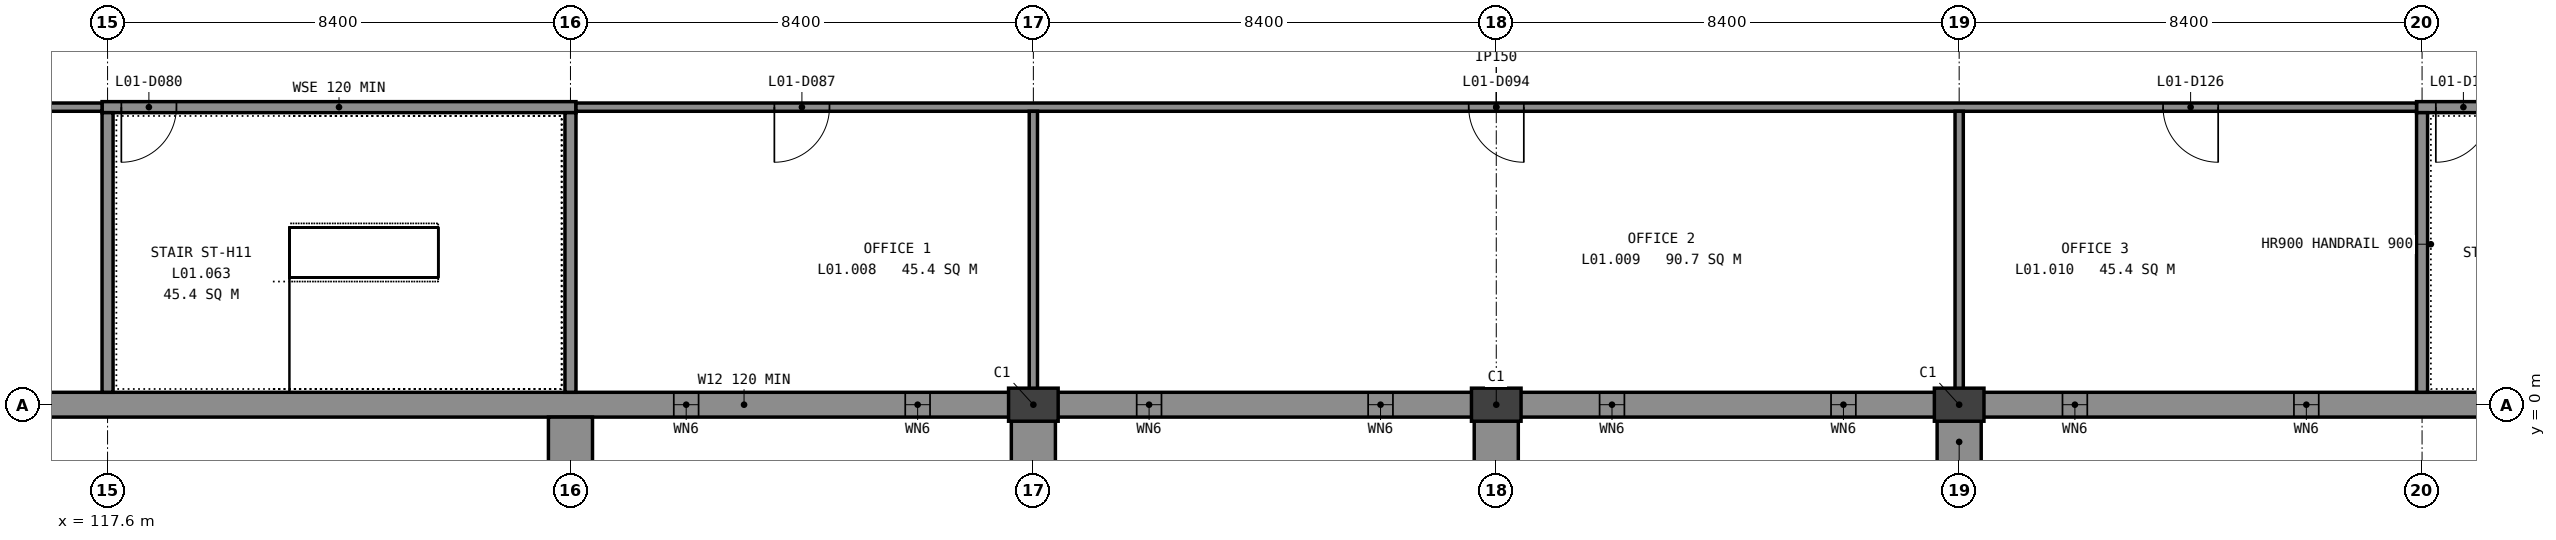
"""IFC4 building model, lengths in metres.
Left out: names, types, materials, properties, quantities, classifications, styles, units other than length and angle.
Written with IfcOpenShell. Run it as: python <this file> out.ifc"""

import sys

from ifc_helpers import new_model, si_unit, direction, frame, frame_2d, origin, origin_2d, place, context, subcontext, project, spatial, rectangle, extrude, element, fill, save


model = new_model("IFC4")
c1 = context("Model", 3, precision=1e-05, world=origin(), true_north=direction((0.0, 1.0)))
c2 = subcontext(c1, "Body", "Model", "MODEL_VIEW")
j1 = project(units=[si_unit("LENGTHUNIT", "METRE"), si_unit("PLANEANGLEUNIT", "RADIAN")], contexts=[c1])
p1 = place(None, origin())
s1 = spatial("IfcSite", under=j1, at=p1, CompositionType="ELEMENT")
p2 = place(p1, origin())
s2 = spatial("IfcBuilding", under=s1, at=p2, CompositionType="ELEMENT")
p3 = place(p2, frame((0.0, 0.0, 5.4)))
s3 = spatial("IfcBuildingStorey", under=s2, at=p3, CompositionType="ELEMENT", Elevation=5.4)
for number, where, z_axis, x_axis in (
    (1, (134.4, 0.0, -0.3), (0.0, 0.0, 1.0), (1.0, 0.0, 0.0)),
    (2, (142.8, 0.0, -0.3), (0.0, 0.0, 1.0), (1.0, 0.0, 0.0)),
    (3, (151.2, 0.0, -0.3), (0.0, 0.0, 1.0), (1.0, 0.0, 0.0)),
):
    element("IfcColumn", number, at=place(p3, frame(where, z_axis=z_axis, x_axis=x_axis)), inside=s3, PredefinedType="PILASTER", context=c2, shape_type="SweptSolid", body=[
        extrude(rectangle(XDim=0.9, YDim=0.6, at=origin_2d()), origin(), (0.0, 0.0, 1.0), 4.55),
    ])
p4 = place(p3, frame((0.0, 0.0, -0.3), z_axis=(0.0, 0.0, 1.0), x_axis=(1.0, 0.0, 0.0)))
e4 = element("IfcWall", 4, at=p4, inside=s3, PredefinedType="SOLIDWALL", context=c2, shape_type="SweptSolid", body=[
    extrude(rectangle(XDim=168.0, YDim=0.45, at=frame_2d((84.0, 0.0))), origin(), (0.0, 0.0, 1.0), 4.55),
])
p5 = place(p4, frame((27.075, 0.0, 1.5)))
e5 = element("IfcOpeningElement", 5, at=p5, cuts=e4, PredefinedType="OPENING", context=c2, shape_type="SweptSolid", body=[
    extrude(rectangle(XDim=0.45, YDim=2.4, at=frame_2d((0.225, 1.2))), frame((0.0, 0.235, 0.0), z_axis=(0.0, -1.0, 0.0), x_axis=(1.0, 0.0, 0.0)), (0.0, 0.0, 1.0), 0.47),
])
p6 = place(p4, frame((31.275, 0.0, 1.5)))
e6 = element("IfcOpeningElement", 6, at=p6, cuts=e4, PredefinedType="OPENING", context=c2, shape_type="SweptSolid", body=[
    extrude(rectangle(XDim=0.45, YDim=2.4, at=frame_2d((0.225, 1.2))), frame((0.0, 0.235, 0.0), z_axis=(0.0, -1.0, 0.0), x_axis=(1.0, 0.0, 0.0)), (0.0, 0.0, 1.0), 0.47),
])
p7 = place(p4, frame((35.475, 0.0, 1.5)))
e7 = element("IfcOpeningElement", 7, at=p7, cuts=e4, PredefinedType="OPENING", context=c2, shape_type="SweptSolid", body=[
    extrude(rectangle(XDim=0.45, YDim=2.4, at=frame_2d((0.225, 1.2))), frame((0.0, 0.235, 0.0), z_axis=(0.0, -1.0, 0.0), x_axis=(1.0, 0.0, 0.0)), (0.0, 0.0, 1.0), 0.47),
])
p8 = place(p4, frame((39.675, 0.0, 1.5)))
e8 = element("IfcOpeningElement", 8, at=p8, cuts=e4, PredefinedType="OPENING", context=c2, shape_type="SweptSolid", body=[
    extrude(rectangle(XDim=0.45, YDim=2.4, at=frame_2d((0.225, 1.2))), frame((0.0, 0.235, 0.0), z_axis=(0.0, -1.0, 0.0), x_axis=(1.0, 0.0, 0.0)), (0.0, 0.0, 1.0), 0.47),
])
p9 = place(p4, frame((94.275, 0.0, 1.5)))
e9 = element("IfcOpeningElement", 9, at=p9, cuts=e4, PredefinedType="OPENING", context=c2, shape_type="SweptSolid", body=[
    extrude(rectangle(XDim=0.45, YDim=2.4, at=frame_2d((0.225, 1.2))), frame((0.0, 0.235, 0.0), z_axis=(0.0, -1.0, 0.0), x_axis=(1.0, 0.0, 0.0)), (0.0, 0.0, 1.0), 0.47),
])
p10 = place(p4, frame((98.475, 0.0, 1.5)))
e10 = element("IfcOpeningElement", 10, at=p10, cuts=e4, PredefinedType="OPENING", context=c2, shape_type="SweptSolid", body=[
    extrude(rectangle(XDim=0.45, YDim=2.4, at=frame_2d((0.225, 1.2))), frame((0.0, 0.235, 0.0), z_axis=(0.0, -1.0, 0.0), x_axis=(1.0, 0.0, 0.0)), (0.0, 0.0, 1.0), 0.47),
])
p11 = place(p4, frame((102.675, 0.0, 1.5)))
e11 = element("IfcOpeningElement", 11, at=p11, cuts=e4, PredefinedType="OPENING", context=c2, shape_type="SweptSolid", body=[
    extrude(rectangle(XDim=0.45, YDim=2.4, at=frame_2d((0.225, 1.2))), frame((0.0, 0.235, 0.0), z_axis=(0.0, -1.0, 0.0), x_axis=(1.0, 0.0, 0.0)), (0.0, 0.0, 1.0), 0.47),
])
p12 = place(p4, frame((106.875, 0.0, 1.5)))
e12 = element("IfcOpeningElement", 12, at=p12, cuts=e4, PredefinedType="OPENING", context=c2, shape_type="SweptSolid", body=[
    extrude(rectangle(XDim=0.45, YDim=2.4, at=frame_2d((0.225, 1.2))), frame((0.0, 0.235, 0.0), z_axis=(0.0, -1.0, 0.0), x_axis=(1.0, 0.0, 0.0)), (0.0, 0.0, 1.0), 0.47),
])
p13 = place(p4, frame((111.075, 0.0, 1.5)))
e13 = element("IfcOpeningElement", 13, at=p13, cuts=e4, PredefinedType="OPENING", context=c2, shape_type="SweptSolid", body=[
    extrude(rectangle(XDim=0.45, YDim=2.4, at=frame_2d((0.225, 1.2))), frame((0.0, 0.235, 0.0), z_axis=(0.0, -1.0, 0.0), x_axis=(1.0, 0.0, 0.0)), (0.0, 0.0, 1.0), 0.47),
])
p14 = place(p4, frame((115.275, 0.0, 1.5)))
e14 = element("IfcOpeningElement", 14, at=p14, cuts=e4, PredefinedType="OPENING", context=c2, shape_type="SweptSolid", body=[
    extrude(rectangle(XDim=0.45, YDim=2.4, at=frame_2d((0.225, 1.2))), frame((0.0, 0.235, 0.0), z_axis=(0.0, -1.0, 0.0), x_axis=(1.0, 0.0, 0.0)), (0.0, 0.0, 1.0), 0.47),
])
p15 = place(p4, frame((127.875, 0.0, 1.5)))
e15 = element("IfcOpeningElement", 15, at=p15, cuts=e4, PredefinedType="OPENING", context=c2, shape_type="SweptSolid", body=[
    extrude(rectangle(XDim=0.45, YDim=2.4, at=frame_2d((0.225, 1.2))), frame((0.0, 0.235, 0.0), z_axis=(0.0, -1.0, 0.0), x_axis=(1.0, 0.0, 0.0)), (0.0, 0.0, 1.0), 0.47),
])
p16 = place(p4, frame((132.075, 0.0, 1.5)))
e16 = element("IfcOpeningElement", 16, at=p16, cuts=e4, PredefinedType="OPENING", context=c2, shape_type="SweptSolid", body=[
    extrude(rectangle(XDim=0.45, YDim=2.4, at=frame_2d((0.225, 1.2))), frame((0.0, 0.235, 0.0), z_axis=(0.0, -1.0, 0.0), x_axis=(1.0, 0.0, 0.0)), (0.0, 0.0, 1.0), 0.47),
])
p17 = place(p4, frame((136.275, 0.0, 1.5)))
e17 = element("IfcOpeningElement", 17, at=p17, cuts=e4, PredefinedType="OPENING", context=c2, shape_type="SweptSolid", body=[
    extrude(rectangle(XDim=0.45, YDim=2.4, at=frame_2d((0.225, 1.2))), frame((0.0, 0.235, 0.0), z_axis=(0.0, -1.0, 0.0), x_axis=(1.0, 0.0, 0.0)), (0.0, 0.0, 1.0), 0.47),
])
p18 = place(p4, frame((140.475, 0.0, 1.5)))
e18 = element("IfcOpeningElement", 18, at=p18, cuts=e4, PredefinedType="OPENING", context=c2, shape_type="SweptSolid", body=[
    extrude(rectangle(XDim=0.45, YDim=2.4, at=frame_2d((0.225, 1.2))), frame((0.0, 0.235, 0.0), z_axis=(0.0, -1.0, 0.0), x_axis=(1.0, 0.0, 0.0)), (0.0, 0.0, 1.0), 0.47),
])
p19 = place(p4, frame((144.675, 0.0, 1.5)))
e19 = element("IfcOpeningElement", 19, at=p19, cuts=e4, PredefinedType="OPENING", context=c2, shape_type="SweptSolid", body=[
    extrude(rectangle(XDim=0.45, YDim=2.4, at=frame_2d((0.225, 1.2))), frame((0.0, 0.235, 0.0), z_axis=(0.0, -1.0, 0.0), x_axis=(1.0, 0.0, 0.0)), (0.0, 0.0, 1.0), 0.47),
])
p20 = place(p4, frame((148.875, 0.0, 1.5)))
e20 = element("IfcOpeningElement", 20, at=p20, cuts=e4, PredefinedType="OPENING", context=c2, shape_type="SweptSolid", body=[
    extrude(rectangle(XDim=0.45, YDim=2.4, at=frame_2d((0.225, 1.2))), frame((0.0, 0.235, 0.0), z_axis=(0.0, -1.0, 0.0), x_axis=(1.0, 0.0, 0.0)), (0.0, 0.0, 1.0), 0.47),
])
p21 = place(p4, frame((153.075, 0.0, 1.5)))
e21 = element("IfcOpeningElement", 21, at=p21, cuts=e4, PredefinedType="OPENING", context=c2, shape_type="SweptSolid", body=[
    extrude(rectangle(XDim=0.45, YDim=2.4, at=frame_2d((0.225, 1.2))), frame((0.0, 0.235, 0.0), z_axis=(0.0, -1.0, 0.0), x_axis=(1.0, 0.0, 0.0)), (0.0, 0.0, 1.0), 0.47),
])
p22 = place(p4, frame((157.275, 0.0, 1.5)))
e22 = element("IfcOpeningElement", 22, at=p22, cuts=e4, PredefinedType="OPENING", context=c2, shape_type="SweptSolid", body=[
    extrude(rectangle(XDim=0.45, YDim=2.4, at=frame_2d((0.225, 1.2))), frame((0.0, 0.235, 0.0), z_axis=(0.0, -1.0, 0.0), x_axis=(1.0, 0.0, 0.0)), (0.0, 0.0, 1.0), 0.47),
])
for number, where, z_axis, x_axis in (
    (23, (126.0, -0.225, -0.3), (0.0, 0.0, 1.0), (0.0, -1.0, 0.0)),
    (24, (134.4, -0.225, -0.3), (0.0, 0.0, 1.0), (0.0, -1.0, 0.0)),
    (25, (142.8, -0.225, -0.3), (0.0, 0.0, 1.0), (0.0, -1.0, 0.0)),
    (26, (151.2, -0.225, -0.3), (0.0, 0.0, 1.0), (0.0, -1.0, 0.0)),
):
    element("IfcWall", number, at=place(p3, frame(where, z_axis=z_axis, x_axis=x_axis)), inside=s3, PredefinedType="SOLIDWALL", context=c2, shape_type="SweptSolid", body=[
        extrude(rectangle(XDim=0.9, YDim=0.8, at=frame_2d((0.45, 0.0))), origin(), (0.0, 0.0, 1.0), 4.55),
    ])
p23 = place(p3, frame((159.5, 5.4, -0.3), z_axis=(0.0, 0.0, 1.0), x_axis=(1.0, 0.0, 0.0)))
e27 = element("IfcWall", 27, at=p23, inside=s3, PredefinedType="SHEAR", context=c2, shape_type="SweptSolid", body=[
    extrude(rectangle(XDim=8.325, YDim=0.2, at=frame_2d((4.163, 0.0))), origin(), (0.0, 0.0, 1.0), 4.5),
])
p24 = place(p23, frame((0.35, 0.0, 0.3)))
e28 = element("IfcOpeningElement", 28, at=p24, cuts=e27, PredefinedType="OPENING", context=c2, shape_type="SweptSolid", body=[
    extrude(rectangle(XDim=1.0, YDim=2.1, at=frame_2d((0.5, 1.05))), frame((0.0, 0.11, 0.0), z_axis=(0.0, -1.0, 0.0), x_axis=(1.0, 0.0, 0.0)), (0.0, 0.0, 1.0), 0.22),
])
p25 = place(p3, frame((159.6, 0.225, -0.3), z_axis=(0.0, 0.0, 1.0), x_axis=(0.0, 1.0, 0.0)))
e29 = element("IfcWall", 29, at=p25, inside=s3, PredefinedType="SHEAR", context=c2, shape_type="SweptSolid", body=[
    extrude(rectangle(XDim=5.075, YDim=0.2, at=frame_2d((2.538, 0.0))), origin(), (0.0, 0.0, 1.0), 4.5),
])
p26 = place(p3, frame((117.5, 5.4, -0.3), z_axis=(0.0, 0.0, 1.0), x_axis=(1.0, 0.0, 0.0)))
e30 = element("IfcWall", 30, at=p26, inside=s3, PredefinedType="SHEAR", context=c2, shape_type="SweptSolid", body=[
    extrude(rectangle(XDim=8.6, YDim=0.2, at=frame_2d((4.3, 0.0))), origin(), (0.0, 0.0, 1.0), 4.5),
])
p27 = place(p26, frame((0.35, 0.0, 0.3)))
e31 = element("IfcOpeningElement", 31, at=p27, cuts=e30, PredefinedType="OPENING", context=c2, shape_type="SweptSolid", body=[
    extrude(rectangle(XDim=1.0, YDim=2.1, at=frame_2d((0.5, 1.05))), frame((0.0, 0.11, 0.0), z_axis=(0.0, -1.0, 0.0), x_axis=(1.0, 0.0, 0.0)), (0.0, 0.0, 1.0), 0.22),
])
for number, where, z_axis, x_axis in (
    (32, (117.6, 0.225, -0.3), (0.0, 0.0, 1.0), (0.0, 1.0, 0.0)),
    (33, (126.0, 0.225, -0.3), (0.0, 0.0, 1.0), (0.0, 1.0, 0.0)),
):
    element("IfcWall", number, at=place(p3, frame(where, z_axis=z_axis, x_axis=x_axis)), inside=s3, PredefinedType="SHEAR", context=c2, shape_type="SweptSolid", body=[
        extrude(rectangle(XDim=5.075, YDim=0.2, at=frame_2d((2.538, 0.0))), origin(), (0.0, 0.0, 1.0), 4.5),
    ])
p28 = place(p3, frame((63.1, 5.4, 0.0), z_axis=(0.0, 0.0, 1.0), x_axis=(1.0, 0.0, 0.0)))
e34 = element("IfcWall", 34, at=p28, inside=s3, PredefinedType="PARTITIONING", context=c2, shape_type="SweptSolid", body=[
    extrude(rectangle(XDim=54.4, YDim=0.15, at=frame_2d((27.2, 0.0))), origin(), (0.0, 0.0, 1.0), 4.2),
])
p29 = place(p28, frame((0.2, 0.0, 0.0)))
e35 = element("IfcOpeningElement", 35, at=p29, cuts=e34, PredefinedType="OPENING", context=c2, shape_type="SweptSolid", body=[
    extrude(rectangle(XDim=2.1, YDim=2.1, at=frame_2d((1.05, 1.05))), frame((0.0, 0.085, 0.0), z_axis=(0.0, -1.0, 0.0), x_axis=(1.0, 0.0, 0.0)), (0.0, 0.0, 1.0), 0.17),
])
p30 = place(p28, frame((18.6, 0.0, 0.0)))
e36 = element("IfcOpeningElement", 36, at=p30, cuts=e34, PredefinedType="OPENING", context=c2, shape_type="SweptSolid", body=[
    extrude(rectangle(XDim=2.1, YDim=2.1, at=frame_2d((1.05, 1.05))), frame((0.0, 0.085, 0.0), z_axis=(0.0, -1.0, 0.0), x_axis=(1.0, 0.0, 0.0)), (0.0, 0.0, 1.0), 0.17),
])
p31 = place(p28, frame((24.6, 0.0, 0.0)))
e37 = element("IfcOpeningElement", 37, at=p31, cuts=e34, PredefinedType="OPENING", context=c2, shape_type="SweptSolid", body=[
    extrude(rectangle(XDim=1.0, YDim=2.1, at=frame_2d((0.5, 1.05))), frame((0.0, 0.085, 0.0), z_axis=(0.0, -1.0, 0.0), x_axis=(1.0, 0.0, 0.0)), (0.0, 0.0, 1.0), 0.17),
])
p32 = place(p28, frame((41.15, 0.0, 0.0)))
e38 = element("IfcOpeningElement", 38, at=p32, cuts=e34, PredefinedType="OPENING", context=c2, shape_type="SweptSolid", body=[
    extrude(rectangle(XDim=1.5, YDim=2.1, at=frame_2d((0.75, 1.05))), frame((0.0, 0.085, 0.0), z_axis=(0.0, -1.0, 0.0), x_axis=(1.0, 0.0, 0.0)), (0.0, 0.0, 1.0), 0.17),
])
p33 = place(p3, frame((126.1, 5.4, 0.0), z_axis=(0.0, 0.0, 1.0), x_axis=(1.0, 0.0, 0.0)))
e39 = element("IfcWall", 39, at=p33, inside=s3, PredefinedType="PARTITIONING", context=c2, shape_type="SweptSolid", body=[
    extrude(rectangle(XDim=33.4, YDim=0.15, at=frame_2d((16.7, 0.0))), origin(), (0.0, 0.0, 1.0), 4.2),
])
p34 = place(p33, frame((3.6, 0.0, 0.0)))
e40 = element("IfcOpeningElement", 40, at=p34, cuts=e39, PredefinedType="OPENING", context=c2, shape_type="SweptSolid", body=[
    extrude(rectangle(XDim=1.0, YDim=2.1, at=frame_2d((0.5, 1.05))), frame((0.0, 0.085, 0.0), z_axis=(0.0, -1.0, 0.0), x_axis=(1.0, 0.0, 0.0)), (0.0, 0.0, 1.0), 0.17),
])
p35 = place(p33, frame((16.2, 0.0, 0.0)))
e41 = element("IfcOpeningElement", 41, at=p35, cuts=e39, PredefinedType="OPENING", context=c2, shape_type="SweptSolid", body=[
    extrude(rectangle(XDim=1.0, YDim=2.1, at=frame_2d((0.5, 1.05))), frame((0.0, 0.085, 0.0), z_axis=(0.0, -1.0, 0.0), x_axis=(1.0, 0.0, 0.0)), (0.0, 0.0, 1.0), 0.17),
])
p36 = place(p33, frame((28.8, 0.0, 0.0)))
e42 = element("IfcOpeningElement", 42, at=p36, cuts=e39, PredefinedType="OPENING", context=c2, shape_type="SweptSolid", body=[
    extrude(rectangle(XDim=1.0, YDim=2.1, at=frame_2d((0.5, 1.05))), frame((0.0, 0.085, 0.0), z_axis=(0.0, -1.0, 0.0), x_axis=(1.0, 0.0, 0.0)), (0.0, 0.0, 1.0), 0.17),
])
for number, where, z_axis, x_axis in (
    (43, (134.4, 0.225, 0.0), (0.0, 0.0, 1.0), (0.0, 1.0, 0.0)),
    (44, (151.2, 0.225, 0.0), (0.0, 0.0, 1.0), (0.0, 1.0, 0.0)),
):
    element("IfcWall", number, at=place(p3, frame(where, z_axis=z_axis, x_axis=x_axis)), inside=s3, PredefinedType="PARTITIONING", context=c2, shape_type="SweptSolid", body=[
        extrude(rectangle(XDim=5.1, YDim=0.15, at=frame_2d((2.55, 0.0))), origin(), (0.0, 0.0, 1.0), 3.5),
    ])
p37 = place(p15, origin())
e45 = element("IfcWindow", 45, at=p37, inside=s3, PartitioningType="SINGLE_PANEL", PredefinedType="WINDOW", context=c2, shape_type="SweptSolid", body=[
    extrude(rectangle(XDim=0.45, YDim=2.4, at=frame_2d((0.225, 1.2))), frame((0.0, 0.03, 0.0), z_axis=(0.0, -1.0, 0.0), x_axis=(1.0, 0.0, 0.0)), (0.0, 0.0, 1.0), 0.06),
])
fill(e15, e45)
p38 = place(p16, origin())
e46 = element("IfcWindow", 46, at=p38, inside=s3, PartitioningType="SINGLE_PANEL", PredefinedType="WINDOW", context=c2, shape_type="SweptSolid", body=[
    extrude(rectangle(XDim=0.45, YDim=2.4, at=frame_2d((0.225, 1.2))), frame((0.0, 0.03, 0.0), z_axis=(0.0, -1.0, 0.0), x_axis=(1.0, 0.0, 0.0)), (0.0, 0.0, 1.0), 0.06),
])
fill(e16, e46)
p39 = place(p17, origin())
e47 = element("IfcWindow", 47, at=p39, inside=s3, PartitioningType="SINGLE_PANEL", PredefinedType="WINDOW", context=c2, shape_type="SweptSolid", body=[
    extrude(rectangle(XDim=0.45, YDim=2.4, at=frame_2d((0.225, 1.2))), frame((0.0, 0.03, 0.0), z_axis=(0.0, -1.0, 0.0), x_axis=(1.0, 0.0, 0.0)), (0.0, 0.0, 1.0), 0.06),
])
fill(e17, e47)
p40 = place(p18, origin())
e48 = element("IfcWindow", 48, at=p40, inside=s3, PartitioningType="SINGLE_PANEL", PredefinedType="WINDOW", context=c2, shape_type="SweptSolid", body=[
    extrude(rectangle(XDim=0.45, YDim=2.4, at=frame_2d((0.225, 1.2))), frame((0.0, 0.03, 0.0), z_axis=(0.0, -1.0, 0.0), x_axis=(1.0, 0.0, 0.0)), (0.0, 0.0, 1.0), 0.06),
])
fill(e18, e48)
p41 = place(p19, origin())
e49 = element("IfcWindow", 49, at=p41, inside=s3, PartitioningType="SINGLE_PANEL", PredefinedType="WINDOW", context=c2, shape_type="SweptSolid", body=[
    extrude(rectangle(XDim=0.45, YDim=2.4, at=frame_2d((0.225, 1.2))), frame((0.0, 0.03, 0.0), z_axis=(0.0, -1.0, 0.0), x_axis=(1.0, 0.0, 0.0)), (0.0, 0.0, 1.0), 0.06),
])
fill(e19, e49)
p42 = place(p20, origin())
e50 = element("IfcWindow", 50, at=p42, inside=s3, PartitioningType="SINGLE_PANEL", PredefinedType="WINDOW", context=c2, shape_type="SweptSolid", body=[
    extrude(rectangle(XDim=0.45, YDim=2.4, at=frame_2d((0.225, 1.2))), frame((0.0, 0.03, 0.0), z_axis=(0.0, -1.0, 0.0), x_axis=(1.0, 0.0, 0.0)), (0.0, 0.0, 1.0), 0.06),
])
fill(e20, e50)
p43 = place(p21, origin())
e51 = element("IfcWindow", 51, at=p43, inside=s3, PartitioningType="SINGLE_PANEL", PredefinedType="WINDOW", context=c2, shape_type="SweptSolid", body=[
    extrude(rectangle(XDim=0.45, YDim=2.4, at=frame_2d((0.225, 1.2))), frame((0.0, 0.03, 0.0), z_axis=(0.0, -1.0, 0.0), x_axis=(1.0, 0.0, 0.0)), (0.0, 0.0, 1.0), 0.06),
])
fill(e21, e51)
p44 = place(p22, origin())
e52 = element("IfcWindow", 52, at=p44, inside=s3, PartitioningType="SINGLE_PANEL", PredefinedType="WINDOW", context=c2, shape_type="SweptSolid", body=[
    extrude(rectangle(XDim=0.45, YDim=2.4, at=frame_2d((0.225, 1.2))), frame((0.0, 0.03, 0.0), z_axis=(0.0, -1.0, 0.0), x_axis=(1.0, 0.0, 0.0)), (0.0, 0.0, 1.0), 0.06),
])
fill(e22, e52)
p45 = place(p24, origin())
e53 = element("IfcDoor", 53, at=p45, inside=s3, OperationType="SINGLE_SWING_LEFT", PredefinedType="DOOR", context=c2, shape_type="SweptSolid", body=[
    extrude(rectangle(XDim=1.0, YDim=2.1, at=frame_2d((0.5, 1.05))), frame((0.0, 0.025, 0.0), z_axis=(0.0, -1.0, 0.0), x_axis=(1.0, 0.0, 0.0)), (0.0, 0.0, 1.0), 0.05),
])
fill(e28, e53)
p46 = place(p27, origin())
e54 = element("IfcDoor", 54, at=p46, inside=s3, OperationType="SINGLE_SWING_LEFT", PredefinedType="DOOR", context=c2, shape_type="SweptSolid", body=[
    extrude(rectangle(XDim=1.0, YDim=2.1, at=frame_2d((0.5, 1.05))), frame((0.0, 0.025, 0.0), z_axis=(0.0, -1.0, 0.0), x_axis=(1.0, 0.0, 0.0)), (0.0, 0.0, 1.0), 0.05),
])
fill(e31, e54)
p47 = place(p34, origin())
e55 = element("IfcDoor", 55, at=p47, inside=s3, OperationType="SINGLE_SWING_LEFT", PredefinedType="DOOR", context=c2, shape_type="SweptSolid", body=[
    extrude(rectangle(XDim=1.0, YDim=2.1, at=frame_2d((0.5, 1.05))), frame((0.0, 0.025, 0.0), z_axis=(0.0, -1.0, 0.0), x_axis=(1.0, 0.0, 0.0)), (0.0, 0.0, 1.0), 0.05),
])
fill(e40, e55)
p48 = place(p35, origin())
e56 = element("IfcDoor", 56, at=p48, inside=s3, OperationType="SINGLE_SWING_RIGHT", PredefinedType="DOOR", context=c2, shape_type="SweptSolid", body=[
    extrude(rectangle(XDim=1.0, YDim=2.1, at=frame_2d((0.5, 1.05))), frame((0.0, 0.025, 0.0), z_axis=(0.0, -1.0, 0.0), x_axis=(1.0, 0.0, 0.0)), (0.0, 0.0, 1.0), 0.05),
])
fill(e41, e56)
p49 = place(p36, origin())
e57 = element("IfcDoor", 57, at=p49, inside=s3, OperationType="SINGLE_SWING_RIGHT", PredefinedType="DOOR", context=c2, shape_type="SweptSolid", body=[
    extrude(rectangle(XDim=1.0, YDim=2.1, at=frame_2d((0.5, 1.05))), frame((0.0, 0.025, 0.0), z_axis=(0.0, -1.0, 0.0), x_axis=(1.0, 0.0, 0.0)), (0.0, 0.0, 1.0), 0.05),
])
fill(e42, e57)
save(model, sys.argv[1])
